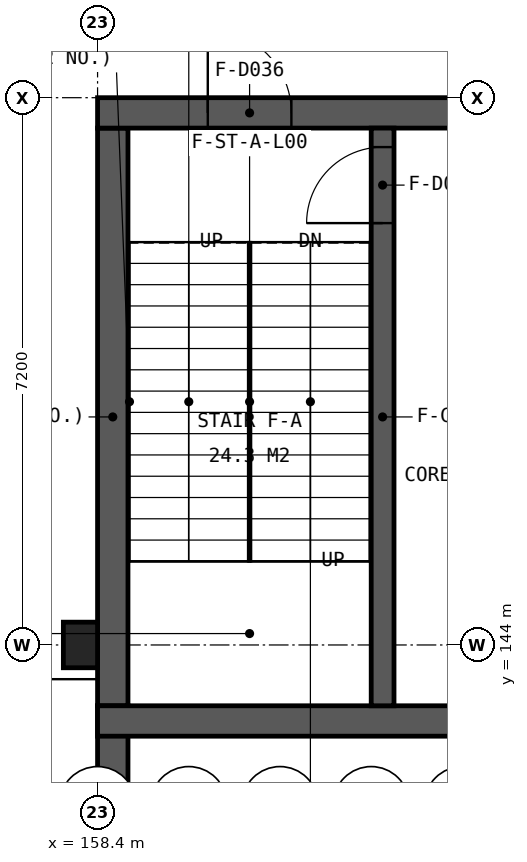
"""IFC4 building model, lengths in metres.
Left out: names, types, materials, properties, quantities, classifications, styles, units other than length and angle.
Written with IfcOpenShell. Run it as: python <this file> out.ifc"""

import sys

from ifc_helpers import new_model, si_unit, direction, frame, frame_2d, origin, origin_2d, place, context, subcontext, project, spatial, rectangle, extrude, element, fill, save


model = new_model("IFC4")
c1 = context("Model", 3, precision=1e-05, world=origin(), true_north=direction((0.0, 1.0)))
c2 = subcontext(c1, "Body", "Model", "MODEL_VIEW")
j1 = project(units=[si_unit("LENGTHUNIT", "METRE"), si_unit("PLANEANGLEUNIT", "RADIAN")], contexts=[c1])
p1 = place(None, origin())
s1 = spatial("IfcSite", under=j1, at=p1, CompositionType="ELEMENT")
p2 = place(p1, origin())
s2 = spatial("IfcBuilding", under=s1, at=p2, CompositionType="ELEMENT")
p3 = place(p2, frame((0.0, 0.0, 4.8)))
s3 = spatial("IfcBuildingStorey", under=s2, at=p3, CompositionType="ELEMENT", Elevation=4.8)
p4 = place(p3, frame((158.6, 137.125, 0.0), z_axis=(0.0, 0.0, 1.0), x_axis=(0.0, 1.0, 0.0)))
e1 = element("IfcWall", 1, at=p4, inside=s3, PredefinedType="SHEAR", context=c2, shape_type="SweptSolid", body=[
    extrude(rectangle(XDim=6.075, YDim=0.4, at=frame_2d((3.038, 0.0))), origin(), (0.0, 0.0, 1.0), 3.95),
])
p5 = place(p4, frame((1.038, 0.0, 1.0)))
e2 = element("IfcOpeningElement", 2, at=p5, cuts=e1, PredefinedType="OPENING", context=c2, shape_type="SweptSolid", body=[
    extrude(rectangle(XDim=1.4, YDim=1.8, at=frame_2d((0.7, 0.9))), frame((0.0, 0.21, 0.0), z_axis=(0.0, -1.0, 0.0), x_axis=(1.0, 0.0, 0.0)), (0.0, 0.0, 1.0), 0.42),
])
p6 = place(p4, frame((3.637, 0.0, 1.0)))
e3 = element("IfcOpeningElement", 3, at=p6, cuts=e1, PredefinedType="OPENING", context=c2, shape_type="SweptSolid", body=[
    extrude(rectangle(XDim=1.4, YDim=1.8, at=frame_2d((0.7, 0.9))), frame((0.0, 0.21, 0.0), z_axis=(0.0, -1.0, 0.0), x_axis=(1.0, 0.0, 0.0)), (0.0, 0.0, 1.0), 0.42),
])
p7 = place(p3, frame((158.6, 143.2, 0.0), z_axis=(0.0, 0.0, 1.0), x_axis=(0.0, 1.0, 0.0)))
e4 = element("IfcWall", 4, at=p7, inside=s3, PredefinedType="SHEAR", context=c2, shape_type="SweptSolid", body=[
    extrude(rectangle(XDim=7.6, YDim=0.4, at=frame_2d((3.8, 0.0))), origin(), (0.0, 0.0, 1.0), 4.55),
])
p8 = place(p3, frame((158.4, 151.0, 0.0), z_axis=(0.0, 0.0, 1.0), x_axis=(1.0, 0.0, 0.0)))
e5 = element("IfcWall", 5, at=p8, inside=s3, PredefinedType="SHEAR", context=c2, shape_type="SweptSolid", body=[
    extrude(rectangle(XDim=10.8, YDim=0.4, at=frame_2d((5.4, 0.0))), origin(), (0.0, 0.0, 1.0), 4.55),
])
p9 = place(p8, frame((1.45, 0.0, 0.0)))
e6 = element("IfcOpeningElement", 6, at=p9, cuts=e5, PredefinedType="OPENING", context=c2, shape_type="SweptSolid", body=[
    extrude(rectangle(XDim=1.1, YDim=2.1, at=frame_2d((0.55, 1.05))), frame((0.0, 0.21, 0.0), z_axis=(0.0, -1.0, 0.0), x_axis=(1.0, 0.0, 0.0)), (0.0, 0.0, 1.0), 0.42),
])
p10 = place(p3, frame((158.4, 143.0, 0.0), z_axis=(0.0, 0.0, 1.0), x_axis=(1.0, 0.0, 0.0)))
e7 = element("IfcWall", 7, at=p10, inside=s3, PredefinedType="SHEAR", context=c2, shape_type="SweptSolid", body=[
    extrude(rectangle(XDim=10.8, YDim=0.4, at=frame_2d((5.4, 0.0))), origin(), (0.0, 0.0, 1.0), 4.55),
])
p11 = place(p10, frame((6.0, 0.0, 0.0)))
e8 = element("IfcOpeningElement", 8, at=p11, cuts=e7, PredefinedType="OPENING", context=c2, shape_type="SweptSolid", body=[
    extrude(rectangle(XDim=1.8, YDim=2.1, at=frame_2d((0.9, 1.05))), frame((0.0, 0.21, 0.0), z_axis=(0.0, -1.0, 0.0), x_axis=(1.0, 0.0, 0.0)), (0.0, 0.0, 1.0), 0.42),
])
p12 = place(p3, frame((162.15, 143.2, 0.0), z_axis=(0.0, 0.0, 1.0), x_axis=(0.0, 1.0, 0.0)))
e9 = element("IfcWall", 9, at=p12, inside=s3, PredefinedType="SHEAR", context=c2, shape_type="SweptSolid", body=[
    extrude(rectangle(XDim=7.6, YDim=0.3, at=frame_2d((3.8, 0.0))), origin(), (0.0, 0.0, 1.0), 4.55),
])
p13 = place(p12, frame((6.35, 0.0, 0.0)))
e10 = element("IfcOpeningElement", 10, at=p13, cuts=e9, PredefinedType="OPENING", context=c2, shape_type="SweptSolid", body=[
    extrude(rectangle(XDim=1.0, YDim=2.1, at=frame_2d((0.5, 1.05))), frame((0.0, 0.16, 0.0), z_axis=(0.0, -1.0, 0.0), x_axis=(1.0, 0.0, 0.0)), (0.0, 0.0, 1.0), 0.32),
])
p14 = place(p3, frame((158.175, 144.0, 0.0), z_axis=(0.0, 0.0, 1.0), x_axis=(0.0, 1.0, 0.0)))
e11 = element("IfcColumn", 11, at=p14, inside=s3, PredefinedType="PILASTER", context=c2, shape_type="SweptSolid", body=[
    extrude(rectangle(XDim=0.6, YDim=0.45, at=origin_2d()), origin(), (0.0, 0.0, 1.0), 4.8),
])
p15 = place(p13, origin())
e12 = element("IfcDoor", 12, at=p15, inside=s3, OperationType="NOTDEFINED", PredefinedType="DOOR", context=c2, shape_type="SweptSolid", body=[
    extrude(rectangle(XDim=1.0, YDim=2.1, at=frame_2d((0.5, 1.05))), frame((0.0, 0.025, 0.0), z_axis=(0.0, -1.0, 0.0), x_axis=(1.0, 0.0, 0.0)), (0.0, 0.0, 1.0), 0.05),
])
fill(e10, e12)
p16 = place(p9, origin())
e13 = element("IfcDoor", 13, at=p16, inside=s3, OperationType="NOTDEFINED", PredefinedType="DOOR", context=c2, shape_type="SweptSolid", body=[
    extrude(rectangle(XDim=1.1, YDim=2.1, at=frame_2d((0.55, 1.05))), frame((0.0, 0.025, 0.0), z_axis=(0.0, -1.0, 0.0), x_axis=(1.0, 0.0, 0.0)), (0.0, 0.0, 1.0), 0.05),
])
fill(e6, e13)
save(model, sys.argv[1])
